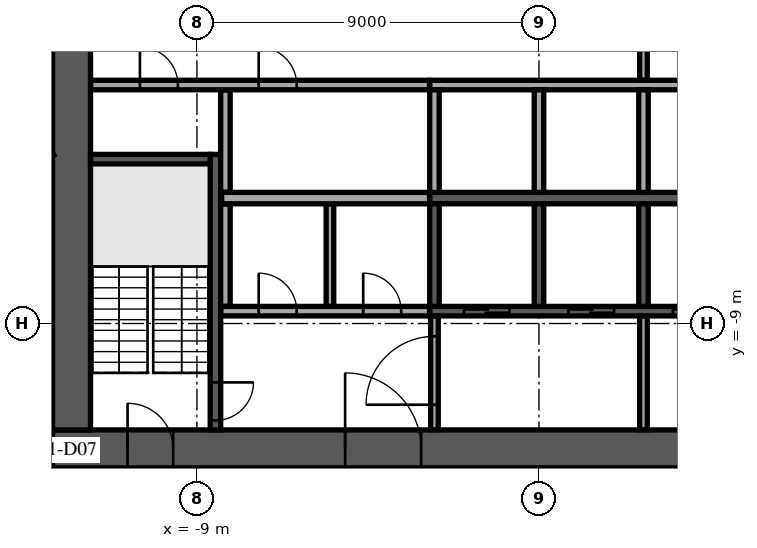
"""IFC4 building model, lengths in metres.
Left out: names, types, materials, properties, quantities, classifications, styles, units other than length and angle.
Written with IfcOpenShell. Run it as: python <this file> out.ifc"""

import sys

from ifc_helpers import new_model, si_unit, direction, frame, frame_2d, origin, place, context, subcontext, project, spatial, rectangle, extrude, element, fill, save


model = new_model("IFC4")
c1 = context("Model", 3, precision=1e-05, world=origin(), true_north=direction((0.0, 1.0)))
c2 = subcontext(c1, "Body", "Model", "MODEL_VIEW")
j1 = project(units=[si_unit("LENGTHUNIT", "METRE"), si_unit("PLANEANGLEUNIT", "RADIAN")], contexts=[c1])
p1 = place(None, origin())
s1 = spatial("IfcSite", under=j1, at=p1, CompositionType="ELEMENT")
p2 = place(p1, origin())
s2 = spatial("IfcBuilding", under=s1, at=p2, CompositionType="ELEMENT")
p3 = place(p2, frame((0.0, 0.0, 135.7)))
s3 = spatial("IfcBuildingStorey", under=s2, at=p3, CompositionType="ELEMENT", Elevation=135.7)
p4 = place(p3, frame((-12.8, -12.3, 0.0), z_axis=(0.0, 0.0, 1.0), x_axis=(1.0, 0.0, 0.0)))
e1 = element("IfcWall", 1, at=p4, inside=s3, PredefinedType="SHEAR", context=c2, shape_type="SweptSolid", body=[
    extrude(rectangle(XDim=25.6, YDim=1.0, at=frame_2d((12.8, 0.0))), origin(), (0.0, 0.0, 1.0), 3.6),
])
p5 = place(p4, frame((7.7, 0.0, 0.0)))
e2 = element("IfcOpeningElement", 2, at=p5, cuts=e1, PredefinedType="OPENING", context=c2, shape_type="SweptSolid", body=[
    extrude(rectangle(XDim=2.0, YDim=2.1, at=frame_2d((1.0, 1.05))), frame((0.0, 0.51, 0.0), z_axis=(0.0, -1.0, 0.0), x_axis=(1.0, 0.0, 0.0)), (0.0, 0.0, 1.0), 1.02),
])
p6 = place(p4, frame((17.825, 0.0, 0.0)))
e3 = element("IfcOpeningElement", 3, at=p6, cuts=e1, PredefinedType="OPENING", context=c2, shape_type="SweptSolid", body=[
    extrude(rectangle(XDim=1.2, YDim=2.1, at=frame_2d((0.6, 1.05))), frame((0.0, 0.51, 0.0), z_axis=(0.0, -1.0, 0.0), x_axis=(1.0, 0.0, 0.0)), (0.0, 0.0, 1.0), 1.02),
])
p7 = place(p4, frame((1.975, 0.0, 0.0)))
e4 = element("IfcOpeningElement", 4, at=p7, cuts=e1, PredefinedType="OPENING", context=c2, shape_type="SweptSolid", body=[
    extrude(rectangle(XDim=1.2, YDim=2.1, at=frame_2d((0.6, 1.05))), frame((0.0, 0.51, 0.0), z_axis=(0.0, -1.0, 0.0), x_axis=(1.0, 0.0, 0.0)), (0.0, 0.0, 1.0), 1.02),
])
p8 = place(p4, frame((22.425, 0.0, 0.0)))
e5 = element("IfcOpeningElement", 5, at=p8, cuts=e1, PredefinedType="OPENING", context=c2, shape_type="SweptSolid", body=[
    extrude(rectangle(XDim=1.2, YDim=2.1, at=frame_2d((0.6, 1.05))), frame((0.0, 0.51, 0.0), z_axis=(0.0, -1.0, 0.0), x_axis=(1.0, 0.0, 0.0)), (0.0, 0.0, 1.0), 1.02),
])
p9 = place(p3, frame((-12.3, -11.8, 0.0), z_axis=(0.0, 0.0, 1.0), x_axis=(0.0, 1.0, 0.0)))
e6 = element("IfcWall", 6, at=p9, inside=s3, PredefinedType="SHEAR", context=c2, shape_type="SweptSolid", body=[
    extrude(rectangle(XDim=23.6, YDim=1.0, at=frame_2d((11.8, 0.0))), origin(), (0.0, 0.0, 1.0), 3.6),
])
p10 = place(p9, frame((10.6, 0.0, 0.0)))
e7 = element("IfcOpeningElement", 7, at=p10, cuts=e6, PredefinedType="OPENING", context=c2, shape_type="SweptSolid", body=[
    extrude(rectangle(XDim=2.4, YDim=2.4, at=frame_2d((1.2, 1.2))), frame((0.0, 0.51, 0.0), z_axis=(0.0, -1.0, 0.0), x_axis=(1.0, 0.0, 0.0)), (0.0, 0.0, 1.0), 1.02),
])
p11 = place(p3, frame((-2.875, -5.7, 0.0), z_axis=(0.0, 0.0, 1.0), x_axis=(1.0, 0.0, 0.0)))
e8 = element("IfcWall", 8, at=p11, inside=s3, PredefinedType="SOLIDWALL", context=c2, shape_type="SweptSolid", body=[
    extrude(rectangle(XDim=11.25, YDim=0.3, at=frame_2d((5.625, 0.0))), origin(), (0.0, 0.0, 1.0), 3.6),
])
p12 = place(p3, frame((-2.875, -2.725, 0.0), z_axis=(0.0, 0.0, 1.0), x_axis=(1.0, 0.0, 0.0)))
e9 = element("IfcWall", 9, at=p12, inside=s3, PredefinedType="SOLIDWALL", context=c2, shape_type="SweptSolid", body=[
    extrude(rectangle(XDim=8.5, YDim=0.25, at=frame_2d((4.25, 0.0))), origin(), (0.0, 0.0, 1.0), 3.6),
])
for number, where, z_axis, x_axis in (
    (10, (-2.75, -5.55, 0.0), (0.0, 0.0, 1.0), (0.0, 1.0, 0.0)),
    (11, (0.0, -5.55, 0.0), (0.0, 0.0, 1.0), (0.0, 1.0, 0.0)),
    (12, (2.75, -5.55, 0.0), (0.0, 0.0, 1.0), (0.0, 1.0, 0.0)),
):
    element("IfcWall", number, at=place(p3, frame(where, z_axis=z_axis, x_axis=x_axis)), inside=s3, PredefinedType="SOLIDWALL", context=c2, shape_type="SweptSolid", body=[
        extrude(rectangle(XDim=2.7, YDim=0.25, at=frame_2d((1.35, 0.0))), origin(), (0.0, 0.0, 1.0), 3.6),
    ])
p13 = place(p3, frame((-2.875, -8.675, 0.0), z_axis=(0.0, 0.0, 1.0), x_axis=(1.0, 0.0, 0.0)))
e13 = element("IfcWall", 13, at=p13, inside=s3, PredefinedType="SOLIDWALL", context=c2, shape_type="SweptSolid", body=[
    extrude(rectangle(XDim=11.25, YDim=0.25, at=frame_2d((5.625, 0.0))), origin(), (0.0, 0.0, 1.0), 3.6),
])
p14 = place(p13, frame((0.9, 0.0, 0.0)))
e14 = element("IfcOpeningElement", 14, at=p14, cuts=e13, PredefinedType="OPENING", context=c2, shape_type="SweptSolid", body=[
    extrude(rectangle(XDim=1.2, YDim=2.1, at=frame_2d((0.6, 1.05))), frame((0.0, 0.135, 0.0), z_axis=(0.0, -1.0, 0.0), x_axis=(1.0, 0.0, 0.0)), (0.0, 0.0, 1.0), 0.27),
])
p15 = place(p13, frame((3.65, 0.0, 0.0)))
e15 = element("IfcOpeningElement", 15, at=p15, cuts=e13, PredefinedType="OPENING", context=c2, shape_type="SweptSolid", body=[
    extrude(rectangle(XDim=1.2, YDim=2.1, at=frame_2d((0.6, 1.05))), frame((0.0, 0.135, 0.0), z_axis=(0.0, -1.0, 0.0), x_axis=(1.0, 0.0, 0.0)), (0.0, 0.0, 1.0), 0.27),
])
p16 = place(p13, frame((6.4, 0.0, 0.0)))
e16 = element("IfcOpeningElement", 16, at=p16, cuts=e13, PredefinedType="OPENING", context=c2, shape_type="SweptSolid", body=[
    extrude(rectangle(XDim=1.2, YDim=2.1, at=frame_2d((0.6, 1.05))), frame((0.0, 0.135, 0.0), z_axis=(0.0, -1.0, 0.0), x_axis=(1.0, 0.0, 0.0)), (0.0, 0.0, 1.0), 0.27),
])
p17 = place(p13, frame((9.15, 0.0, 0.0)))
e17 = element("IfcOpeningElement", 17, at=p17, cuts=e13, PredefinedType="OPENING", context=c2, shape_type="SweptSolid", body=[
    extrude(rectangle(XDim=1.2, YDim=2.1, at=frame_2d((0.6, 1.05))), frame((0.0, 0.135, 0.0), z_axis=(0.0, -1.0, 0.0), x_axis=(1.0, 0.0, 0.0)), (0.0, 0.0, 1.0), 0.27),
])
for number, where, z_axis, x_axis in (
    (18, (-2.75, -8.55, 0.0), (0.0, 0.0, 1.0), (0.0, 1.0, 0.0)),
    (19, (0.0, -8.55, 0.0), (0.0, 0.0, 1.0), (0.0, 1.0, 0.0)),
    (20, (2.75, -8.55, 0.0), (0.0, 0.0, 1.0), (0.0, 1.0, 0.0)),
):
    element("IfcWall", number, at=place(p3, frame(where, z_axis=z_axis, x_axis=x_axis)), inside=s3, PredefinedType="SOLIDWALL", context=c2, shape_type="SweptSolid", body=[
        extrude(rectangle(XDim=2.7, YDim=0.25, at=frame_2d((1.35, 0.0))), origin(), (0.0, 0.0, 1.0), 3.6),
    ])
p18 = place(p3, frame((-8.512, -4.55, 0.0), z_axis=(0.0, 0.0, 1.0), x_axis=(0.0, -1.0, 0.0)))
e21 = element("IfcWall", 21, at=p18, inside=s3, PredefinedType="SOLIDWALL", context=c2, shape_type="SweptSolid", body=[
    extrude(rectangle(XDim=7.25, YDim=0.275, at=frame_2d((3.625, 0.0))), origin(), (0.0, 0.0, 1.0), 3.6),
])
p19 = place(p18, frame((6.0, 0.0, 0.0)))
e22 = element("IfcOpeningElement", 22, at=p19, cuts=e21, PredefinedType="OPENING", context=c2, shape_type="SweptSolid", body=[
    extrude(rectangle(XDim=1.0, YDim=2.1, at=frame_2d((0.5, 1.05))), frame((0.0, 0.147, 0.0), z_axis=(0.0, -1.0, 0.0), x_axis=(1.0, 0.0, 0.0)), (0.0, 0.0, 1.0), 0.295),
])
p20 = place(p3, frame((-8.65, -4.675, 0.0), z_axis=(0.0, 0.0, 1.0), x_axis=(-1.0, 0.0, 0.0)))
e23 = element("IfcWall", 23, at=p20, inside=s3, PredefinedType="SOLIDWALL", context=c2, shape_type="SweptSolid", body=[
    extrude(rectangle(XDim=3.15, YDim=0.25, at=frame_2d((1.575, 0.0))), origin(), (0.0, 0.0, 1.0), 3.6),
])
p21 = place(p3, frame((-2.75, -11.795, 0.0), z_axis=(0.0, 0.0, 1.0), x_axis=(0.0, 1.0, 0.0)))
e24 = element("IfcWall", 24, at=p21, inside=s3, PredefinedType="PARTITIONING", context=c2, shape_type="SweptSolid", body=[
    extrude(rectangle(XDim=2.99, YDim=0.2, at=frame_2d((1.495, 0.0))), origin(), (0.0, 0.0, 1.0), 3.6),
])
p22 = place(p21, frame((0.657, 0.0, 0.0)))
e25 = element("IfcOpeningElement", 25, at=p22, cuts=e24, PredefinedType="OPENING", context=c2, shape_type="SweptSolid", body=[
    extrude(rectangle(XDim=1.8, YDim=2.1, at=frame_2d((0.9, 1.05))), frame((0.0, 0.11, 0.0), z_axis=(0.0, -1.0, 0.0), x_axis=(1.0, 0.0, 0.0)), (0.0, 0.0, 1.0), 0.22),
])
p23 = place(p3, frame((2.75, -11.795, 0.0), z_axis=(0.0, 0.0, 1.0), x_axis=(0.0, 1.0, 0.0)))
e26 = element("IfcWall", 26, at=p23, inside=s3, PredefinedType="PARTITIONING", context=c2, shape_type="SweptSolid", body=[
    extrude(rectangle(XDim=2.99, YDim=0.2, at=frame_2d((1.495, 0.0))), origin(), (0.0, 0.0, 1.0), 3.6),
])
p24 = place(p3, frame((-8.37, -8.675, 0.0), z_axis=(0.0, 0.0, 1.0), x_axis=(1.0, 0.0, 0.0)))
e27 = element("IfcWall", 27, at=p24, inside=s3, PredefinedType="PARTITIONING", context=c2, shape_type="SweptSolid", body=[
    extrude(rectangle(XDim=5.49, YDim=0.25, at=frame_2d((2.745, 0.0))), origin(), (0.0, 0.0, 1.0), 3.6),
])
p25 = place(p24, frame((0.995, 0.0, 0.0)))
e28 = element("IfcOpeningElement", 28, at=p25, cuts=e27, PredefinedType="OPENING", context=c2, shape_type="SweptSolid", body=[
    extrude(rectangle(XDim=1.0, YDim=2.1, at=frame_2d((0.5, 1.05))), frame((0.0, 0.135, 0.0), z_axis=(0.0, -1.0, 0.0), x_axis=(1.0, 0.0, 0.0)), (0.0, 0.0, 1.0), 0.27),
])
p26 = place(p24, frame((3.745, 0.0, 0.0)))
e29 = element("IfcOpeningElement", 29, at=p26, cuts=e27, PredefinedType="OPENING", context=c2, shape_type="SweptSolid", body=[
    extrude(rectangle(XDim=1.0, YDim=2.1, at=frame_2d((0.5, 1.05))), frame((0.0, 0.135, 0.0), z_axis=(0.0, -1.0, 0.0), x_axis=(1.0, 0.0, 0.0)), (0.0, 0.0, 1.0), 0.27),
])
p27 = place(p3, frame((-8.25, -8.545, 0.0), z_axis=(0.0, 0.0, 1.0), x_axis=(0.0, 1.0, 0.0)))
e30 = element("IfcWall", 30, at=p27, inside=s3, PredefinedType="PARTITIONING", context=c2, shape_type="SweptSolid", body=[
    extrude(rectangle(XDim=2.69, YDim=0.25, at=frame_2d((1.345, 0.0))), origin(), (0.0, 0.0, 1.0), 3.6),
])
p28 = place(p3, frame((-5.5, -8.545, 0.0), z_axis=(0.0, 0.0, 1.0), x_axis=(0.0, 1.0, 0.0)))
e31 = element("IfcWall", 31, at=p28, inside=s3, PredefinedType="PARTITIONING", context=c2, shape_type="SweptSolid", body=[
    extrude(rectangle(XDim=2.69, YDim=0.2, at=frame_2d((1.345, 0.0))), origin(), (0.0, 0.0, 1.0), 3.6),
])
p29 = place(p3, frame((-8.35, -5.7, 0.0), z_axis=(0.0, 0.0, 1.0), x_axis=(1.0, 0.0, 0.0)))
e32 = element("IfcWall", 32, at=p29, inside=s3, PredefinedType="PARTITIONING", context=c2, shape_type="SweptSolid", body=[
    extrude(rectangle(XDim=5.47, YDim=0.3, at=frame_2d((2.735, 0.0))), origin(), (0.0, 0.0, 1.0), 3.6),
])
p30 = place(p3, frame((-8.25, -5.545, 0.0), z_axis=(0.0, 0.0, 1.0), x_axis=(0.0, 1.0, 0.0)))
e33 = element("IfcWall", 33, at=p30, inside=s3, PredefinedType="PARTITIONING", context=c2, shape_type="SweptSolid", body=[
    extrude(rectangle(XDim=2.69, YDim=0.25, at=frame_2d((1.345, 0.0))), origin(), (0.0, 0.0, 1.0), 3.6),
])
p31 = place(p3, frame((-11.795, -2.725, 0.0), z_axis=(0.0, 0.0, 1.0), x_axis=(1.0, 0.0, 0.0)))
e34 = element("IfcWall", 34, at=p31, inside=s3, PredefinedType="PARTITIONING", context=c2, shape_type="SweptSolid", body=[
    extrude(rectangle(XDim=8.915, YDim=0.25, at=frame_2d((4.458, 0.0))), origin(), (0.0, 0.0, 1.0), 3.6),
])
p32 = place(p31, frame((1.295, 0.0, 0.0)))
e35 = element("IfcOpeningElement", 35, at=p32, cuts=e34, PredefinedType="OPENING", context=c2, shape_type="SweptSolid", body=[
    extrude(rectangle(XDim=1.0, YDim=2.1, at=frame_2d((0.5, 1.05))), frame((0.0, 0.135, 0.0), z_axis=(0.0, -1.0, 0.0), x_axis=(1.0, 0.0, 0.0)), (0.0, 0.0, 1.0), 0.27),
])
p33 = place(p31, frame((4.42, 0.0, 0.0)))
e36 = element("IfcOpeningElement", 36, at=p33, cuts=e34, PredefinedType="OPENING", context=c2, shape_type="SweptSolid", body=[
    extrude(rectangle(XDim=1.0, YDim=2.1, at=frame_2d((0.5, 1.05))), frame((0.0, 0.135, 0.0), z_axis=(0.0, -1.0, 0.0), x_axis=(1.0, 0.0, 0.0)), (0.0, 0.0, 1.0), 0.27),
])
p34 = place(p3, frame((2.75, -2.595, 0.0), z_axis=(0.0, 0.0, 1.0), x_axis=(0.0, 1.0, 0.0)))
e37 = element("IfcWall", 37, at=p34, inside=s3, PredefinedType="PARTITIONING", context=c2, shape_type="SweptSolid", body=[
    extrude(rectangle(XDim=5.19, YDim=0.2, at=frame_2d((2.595, 0.0))), origin(), (0.0, 0.0, 1.0), 3.6),
])
p35 = place(p34, frame((1.395, 0.0, 0.0)))
e38 = element("IfcOpeningElement", 38, at=p35, cuts=e37, PredefinedType="OPENING", context=c2, shape_type="SweptSolid", body=[
    extrude(rectangle(XDim=2.4, YDim=2.4, at=frame_2d((1.2, 1.2))), frame((0.0, 0.11, 0.0), z_axis=(0.0, -1.0, 0.0), x_axis=(1.0, 0.0, 0.0)), (0.0, 0.0, 1.0), 0.22),
])
p36 = place(p3, frame((-9.103, -34.888, 0.0), z_axis=(0.0, 0.0, 1.0), x_axis=(0.874618897425, 0.484811081007, 0.0)))
e39 = element("IfcWall", 39, at=p36, inside=s3, PredefinedType="STANDARD", context=c2, shape_type="SweptSolid", body=[
    extrude(rectangle(XDim=49.751, YDim=0.6, at=frame_2d((24.876, 0.0))), origin(), (0.0, 0.0, 1.0), 3.6),
])
p37 = place(p36, frame((1.161, 0.0, 0.9)))
e40 = element("IfcOpeningElement", 40, at=p37, cuts=e39, PredefinedType="OPENING", context=c2, shape_type="SweptSolid", body=[
    extrude(rectangle(XDim=2.1, YDim=2.1, at=frame_2d((1.05, 1.05))), frame((0.0, 0.31, 0.0), z_axis=(0.0, -1.0, 0.0), x_axis=(1.0, 0.0, 0.0)), (0.0, 0.0, 1.0), 0.62),
])
p38 = place(p36, frame((5.644, 0.0, 0.9)))
e41 = element("IfcOpeningElement", 41, at=p38, cuts=e39, PredefinedType="OPENING", context=c2, shape_type="SweptSolid", body=[
    extrude(rectangle(XDim=2.1, YDim=2.1, at=frame_2d((1.05, 1.05))), frame((0.0, 0.31, 0.0), z_axis=(0.0, -1.0, 0.0), x_axis=(1.0, 0.0, 0.0)), (0.0, 0.0, 1.0), 0.62),
])
p39 = place(p36, frame((10.189, 0.0, 0.9)))
e42 = element("IfcOpeningElement", 42, at=p39, cuts=e39, PredefinedType="OPENING", context=c2, shape_type="SweptSolid", body=[
    extrude(rectangle(XDim=2.1, YDim=2.1, at=frame_2d((1.05, 1.05))), frame((0.0, 0.31, 0.0), z_axis=(0.0, -1.0, 0.0), x_axis=(1.0, 0.0, 0.0)), (0.0, 0.0, 1.0), 0.62),
])
p40 = place(p36, frame((14.735, 0.0, 0.9)))
e43 = element("IfcOpeningElement", 43, at=p40, cuts=e39, PredefinedType="OPENING", context=c2, shape_type="SweptSolid", body=[
    extrude(rectangle(XDim=2.1, YDim=2.1, at=frame_2d((1.05, 1.05))), frame((0.0, 0.31, 0.0), z_axis=(0.0, -1.0, 0.0), x_axis=(1.0, 0.0, 0.0)), (0.0, 0.0, 1.0), 0.62),
])
p41 = place(p36, frame((19.28, 0.0, 0.9)))
e44 = element("IfcOpeningElement", 44, at=p41, cuts=e39, PredefinedType="OPENING", context=c2, shape_type="SweptSolid", body=[
    extrude(rectangle(XDim=2.1, YDim=2.1, at=frame_2d((1.05, 1.05))), frame((0.0, 0.31, 0.0), z_axis=(0.0, -1.0, 0.0), x_axis=(1.0, 0.0, 0.0)), (0.0, 0.0, 1.0), 0.62),
])
p42 = place(p36, frame((23.826, 0.0, 0.9)))
e45 = element("IfcOpeningElement", 45, at=p42, cuts=e39, PredefinedType="OPENING", context=c2, shape_type="SweptSolid", body=[
    extrude(rectangle(XDim=2.1, YDim=2.1, at=frame_2d((1.05, 1.05))), frame((0.0, 0.31, 0.0), z_axis=(0.0, -1.0, 0.0), x_axis=(1.0, 0.0, 0.0)), (0.0, 0.0, 1.0), 0.62),
])
p43 = place(p36, frame((28.371, 0.0, 0.9)))
e46 = element("IfcOpeningElement", 46, at=p43, cuts=e39, PredefinedType="OPENING", context=c2, shape_type="SweptSolid", body=[
    extrude(rectangle(XDim=2.1, YDim=2.1, at=frame_2d((1.05, 1.05))), frame((0.0, 0.31, 0.0), z_axis=(0.0, -1.0, 0.0), x_axis=(1.0, 0.0, 0.0)), (0.0, 0.0, 1.0), 0.62),
])
p44 = place(p36, frame((32.917, 0.0, 0.9)))
e47 = element("IfcOpeningElement", 47, at=p44, cuts=e39, PredefinedType="OPENING", context=c2, shape_type="SweptSolid", body=[
    extrude(rectangle(XDim=2.1, YDim=2.1, at=frame_2d((1.05, 1.05))), frame((0.0, 0.31, 0.0), z_axis=(0.0, -1.0, 0.0), x_axis=(1.0, 0.0, 0.0)), (0.0, 0.0, 1.0), 0.62),
])
p45 = place(p36, frame((37.462, 0.0, 0.9)))
e48 = element("IfcOpeningElement", 48, at=p45, cuts=e39, PredefinedType="OPENING", context=c2, shape_type="SweptSolid", body=[
    extrude(rectangle(XDim=2.1, YDim=2.1, at=frame_2d((1.05, 1.05))), frame((0.0, 0.31, 0.0), z_axis=(0.0, -1.0, 0.0), x_axis=(1.0, 0.0, 0.0)), (0.0, 0.0, 1.0), 0.62),
])
p46 = place(p36, frame((42.008, 0.0, 0.9)))
e49 = element("IfcOpeningElement", 49, at=p46, cuts=e39, PredefinedType="OPENING", context=c2, shape_type="SweptSolid", body=[
    extrude(rectangle(XDim=2.1, YDim=2.1, at=frame_2d((1.05, 1.05))), frame((0.0, 0.31, 0.0), z_axis=(0.0, -1.0, 0.0), x_axis=(1.0, 0.0, 0.0)), (0.0, 0.0, 1.0), 0.62),
])
p47 = place(p36, frame((46.491, 0.0, 0.9)))
e50 = element("IfcOpeningElement", 50, at=p47, cuts=e39, PredefinedType="OPENING", context=c2, shape_type="SweptSolid", body=[
    extrude(rectangle(XDim=2.1, YDim=2.1, at=frame_2d((1.05, 1.05))), frame((0.0, 0.31, 0.0), z_axis=(0.0, -1.0, 0.0), x_axis=(1.0, 0.0, 0.0)), (0.0, 0.0, 1.0), 0.62),
])
p48 = place(p3, frame((-18.893, -7.882, 0.0), z_axis=(0.0, 0.0, 1.0), x_axis=(0.874670900287, 0.484717253861, 0.0)))
e51 = element("IfcWall", 51, at=p48, inside=s3, PredefinedType="PARTITIONING", context=c2, shape_type="SweptSolid", body=[
    extrude(rectangle(XDim=6.966, YDim=0.15, at=frame_2d((3.483, 0.0))), origin(), (0.0, 0.0, 1.0), 3.15),
])
p49 = place(p3, frame((-4.484, -24.462, 0.0), z_axis=(0.0, 0.0, 1.0), x_axis=(0.874618059696, 0.484812592301, 0.0)))
e52 = element("IfcWall", 52, at=p49, inside=s3, PredefinedType="PARTITIONING", context=c2, shape_type="SweptSolid", body=[
    extrude(rectangle(XDim=31.638, YDim=0.15, at=frame_2d((15.819, 0.0))), origin(), (0.0, 0.0, 1.0), 3.15),
])
p50 = place(p49, frame((9.25, 0.0, 0.0)))
e53 = element("IfcOpeningElement", 53, at=p50, cuts=e52, PredefinedType="OPENING", context=c2, shape_type="SweptSolid", body=[
    extrude(rectangle(XDim=1.0, YDim=2.1, at=frame_2d((0.5, 1.05))), frame((0.0, 0.085, 0.0), z_axis=(0.0, -1.0, 0.0), x_axis=(1.0, 0.0, 0.0)), (0.0, 0.0, 1.0), 0.17),
])
p51 = place(p49, frame((19.239, 0.0, 0.0)))
e54 = element("IfcOpeningElement", 54, at=p51, cuts=e52, PredefinedType="OPENING", context=c2, shape_type="SweptSolid", body=[
    extrude(rectangle(XDim=1.0, YDim=2.1, at=frame_2d((0.5, 1.05))), frame((0.0, 0.085, 0.0), z_axis=(0.0, -1.0, 0.0), x_axis=(1.0, 0.0, 0.0)), (0.0, 0.0, 1.0), 0.17),
])
p52 = place(p49, frame((24.772, 0.0, 0.0)))
e55 = element("IfcOpeningElement", 55, at=p52, cuts=e52, PredefinedType="OPENING", context=c2, shape_type="SweptSolid", body=[
    extrude(rectangle(XDim=1.0, YDim=2.1, at=frame_2d((0.5, 1.05))), frame((0.0, 0.085, 0.0), z_axis=(0.0, -1.0, 0.0), x_axis=(1.0, 0.0, 0.0)), (0.0, 0.0, 1.0), 0.17),
])
p53 = place(p5, origin())
e56 = element("IfcDoor", 56, at=p53, inside=s3, OperationType="SINGLE_SWING_LEFT", PredefinedType="DOOR", context=c2, shape_type="SweptSolid", body=[
    extrude(rectangle(XDim=2.0, YDim=2.1, at=frame_2d((1.0, 1.05))), frame((0.0, 0.025, 0.0), z_axis=(0.0, -1.0, 0.0), x_axis=(1.0, 0.0, 0.0)), (0.0, 0.0, 1.0), 0.05),
])
fill(e2, e56)
p54 = place(p7, origin())
e57 = element("IfcDoor", 57, at=p54, inside=s3, OperationType="SINGLE_SWING_LEFT", PredefinedType="DOOR", context=c2, shape_type="SweptSolid", body=[
    extrude(rectangle(XDim=1.2, YDim=2.1, at=frame_2d((0.6, 1.05))), frame((0.0, 0.025, 0.0), z_axis=(0.0, -1.0, 0.0), x_axis=(1.0, 0.0, 0.0)), (0.0, 0.0, 1.0), 0.05),
])
fill(e4, e57)
p55 = place(p14, origin())
e58 = element("IfcDoor", 58, at=p55, inside=s3, OperationType="DOUBLE_DOOR_SLIDING", PredefinedType="DOOR", context=c2, shape_type="SweptSolid", body=[
    extrude(rectangle(XDim=1.2, YDim=2.1, at=frame_2d((0.6, 1.05))), frame((0.0, 0.025, 0.0), z_axis=(0.0, -1.0, 0.0), x_axis=(1.0, 0.0, 0.0)), (0.0, 0.0, 1.0), 0.05),
])
fill(e14, e58)
p56 = place(p15, origin())
e59 = element("IfcDoor", 59, at=p56, inside=s3, OperationType="DOUBLE_DOOR_SLIDING", PredefinedType="DOOR", context=c2, shape_type="SweptSolid", body=[
    extrude(rectangle(XDim=1.2, YDim=2.1, at=frame_2d((0.6, 1.05))), frame((0.0, 0.025, 0.0), z_axis=(0.0, -1.0, 0.0), x_axis=(1.0, 0.0, 0.0)), (0.0, 0.0, 1.0), 0.05),
])
fill(e15, e59)
p57 = place(p16, origin())
e60 = element("IfcDoor", 60, at=p57, inside=s3, OperationType="DOUBLE_DOOR_SLIDING", PredefinedType="DOOR", context=c2, shape_type="SweptSolid", body=[
    extrude(rectangle(XDim=1.2, YDim=2.1, at=frame_2d((0.6, 1.05))), frame((0.0, 0.025, 0.0), z_axis=(0.0, -1.0, 0.0), x_axis=(1.0, 0.0, 0.0)), (0.0, 0.0, 1.0), 0.05),
])
fill(e16, e60)
p58 = place(p19, origin())
e61 = element("IfcDoor", 61, at=p58, inside=s3, OperationType="SINGLE_SWING_LEFT", PredefinedType="DOOR", context=c2, shape_type="SweptSolid", body=[
    extrude(rectangle(XDim=1.0, YDim=2.1, at=frame_2d((0.5, 1.05))), frame((0.0, 0.025, 0.0), z_axis=(0.0, -1.0, 0.0), x_axis=(1.0, 0.0, 0.0)), (0.0, 0.0, 1.0), 0.05),
])
fill(e22, e61)
p59 = place(p25, origin())
e62 = element("IfcDoor", 62, at=p59, inside=s3, OperationType="SINGLE_SWING_RIGHT", PredefinedType="DOOR", context=c2, shape_type="SweptSolid", body=[
    extrude(rectangle(XDim=1.0, YDim=2.1, at=frame_2d((0.5, 1.05))), frame((0.0, 0.025, 0.0), z_axis=(0.0, -1.0, 0.0), x_axis=(1.0, 0.0, 0.0)), (0.0, 0.0, 1.0), 0.05),
])
fill(e28, e62)
p60 = place(p26, origin())
e63 = element("IfcDoor", 63, at=p60, inside=s3, OperationType="SINGLE_SWING_RIGHT", PredefinedType="DOOR", context=c2, shape_type="SweptSolid", body=[
    extrude(rectangle(XDim=1.0, YDim=2.1, at=frame_2d((0.5, 1.05))), frame((0.0, 0.025, 0.0), z_axis=(0.0, -1.0, 0.0), x_axis=(1.0, 0.0, 0.0)), (0.0, 0.0, 1.0), 0.05),
])
fill(e29, e63)
p61 = place(p32, origin())
e64 = element("IfcDoor", 64, at=p61, inside=s3, OperationType="SINGLE_SWING_RIGHT", PredefinedType="DOOR", context=c2, shape_type="SweptSolid", body=[
    extrude(rectangle(XDim=1.0, YDim=2.1, at=frame_2d((0.5, 1.05))), frame((0.0, 0.025, 0.0), z_axis=(0.0, -1.0, 0.0), x_axis=(1.0, 0.0, 0.0)), (0.0, 0.0, 1.0), 0.05),
])
fill(e35, e64)
p62 = place(p33, origin())
e65 = element("IfcDoor", 65, at=p62, inside=s3, OperationType="SINGLE_SWING_RIGHT", PredefinedType="DOOR", context=c2, shape_type="SweptSolid", body=[
    extrude(rectangle(XDim=1.0, YDim=2.1, at=frame_2d((0.5, 1.05))), frame((0.0, 0.025, 0.0), z_axis=(0.0, -1.0, 0.0), x_axis=(1.0, 0.0, 0.0)), (0.0, 0.0, 1.0), 0.05),
])
fill(e36, e65)
p63 = place(p22, origin())
e66 = element("IfcDoor", 66, at=p63, inside=s3, OperationType="SINGLE_SWING_LEFT", PredefinedType="DOOR", context=c2, shape_type="SweptSolid", body=[
    extrude(rectangle(XDim=1.8, YDim=2.1, at=frame_2d((0.9, 1.05))), frame((0.0, 0.025, 0.0), z_axis=(0.0, -1.0, 0.0), x_axis=(1.0, 0.0, 0.0)), (0.0, 0.0, 1.0), 0.05),
])
fill(e25, e66)
save(model, sys.argv[1])
